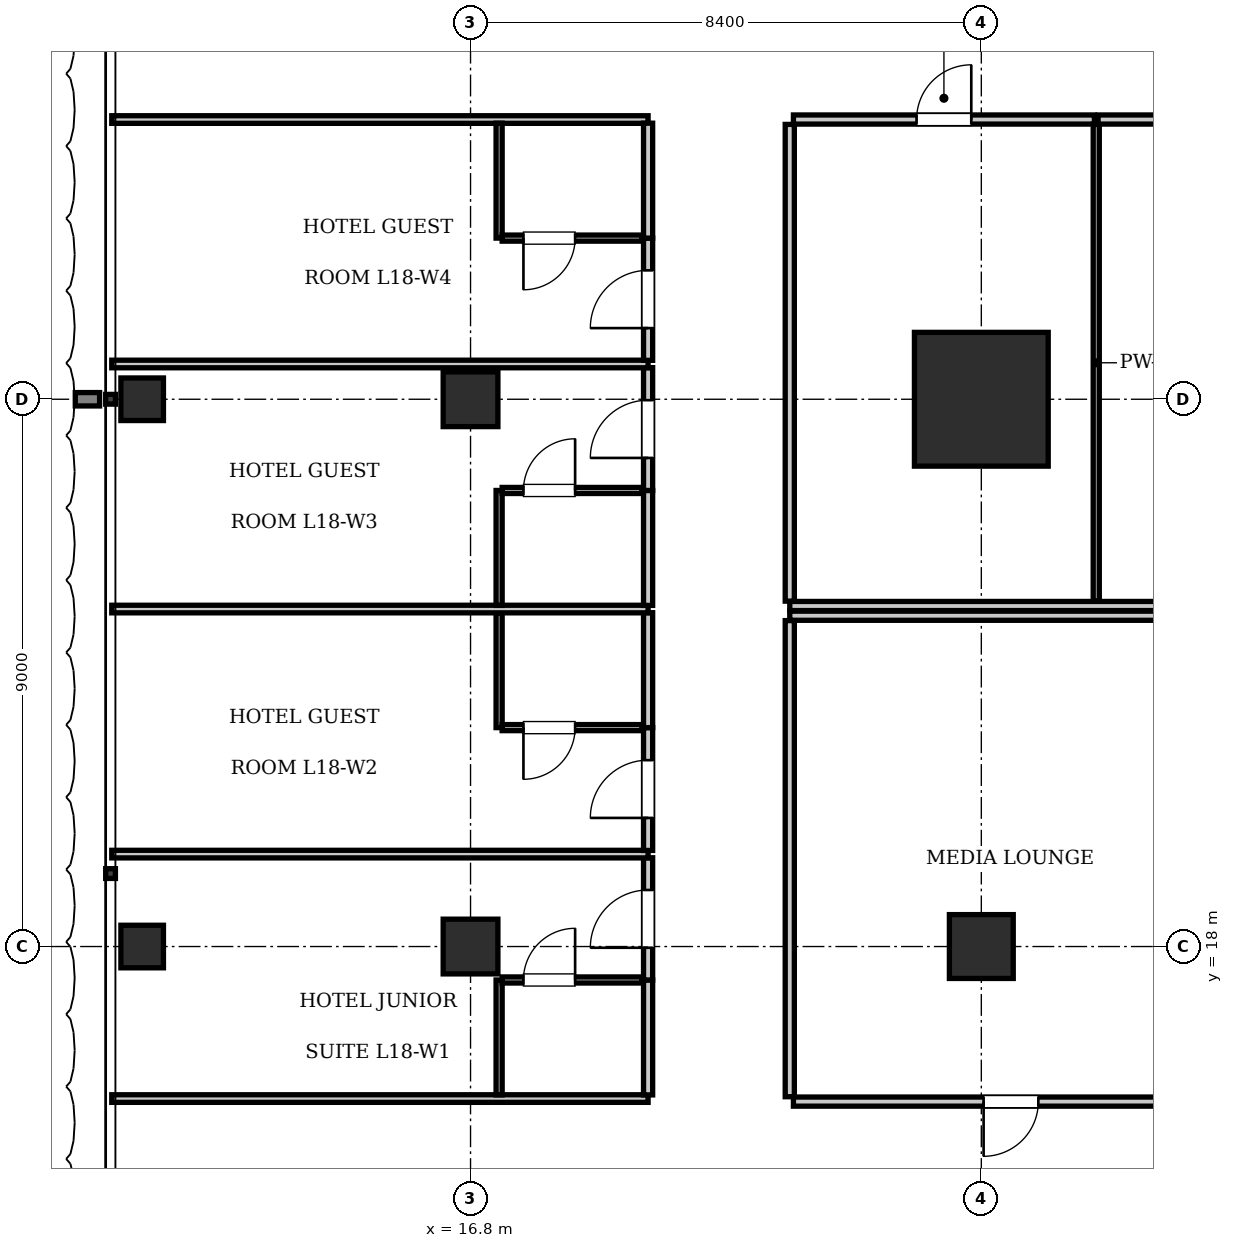
"""IFC4 building model, lengths in metres.
Left out: names, types, materials, properties, quantities, classifications, styles, units other than length and angle.
Written with IfcOpenShell. Run it as: python <this file> out.ifc"""

import sys

from ifc_helpers import new_model, si_unit, direction, frame, frame_2d, origin, origin_2d, place, context, subcontext, project, spatial, rectangle, i_section, extrude, element, fill, save


model = new_model("IFC4")
c1 = context("Model", 3, precision=1e-05, world=origin(), true_north=direction((0.0, 1.0)))
c2 = subcontext(c1, "Body", "Model", "MODEL_VIEW")
j1 = project(units=[si_unit("LENGTHUNIT", "METRE"), si_unit("PLANEANGLEUNIT", "RADIAN")], contexts=[c1])
p1 = place(None, origin())
s1 = spatial("IfcSite", under=j1, at=p1, CompositionType="ELEMENT")
p2 = place(p1, origin())
s2 = spatial("IfcBuilding", under=s1, at=p2, CompositionType="ELEMENT")
p3 = place(p2, frame((0.0, 0.0, 77.0)))
s3 = spatial("IfcBuildingStorey", under=s2, at=p3, CompositionType="ELEMENT", Elevation=77.0)
p4 = place(p3, frame((25.2, 27.0, 0.0), z_axis=(0.0, 0.0, 1.0), x_axis=(1.0, 0.0, 0.0)))
e1 = element("IfcColumn", 1, at=p4, inside=s3, PredefinedType="COLUMN", context=c2, shape_type="SweptSolid", body=[
    extrude(rectangle(XDim=2.2, YDim=2.2, at=origin_2d()), origin(), (0.0, 0.0, 1.0), 3.85),
])
p5 = place(p3, frame((25.2, 18.0, 0.0), z_axis=(0.0, 0.0, 1.0), x_axis=(1.0, 0.0, 0.0)))
e2 = element("IfcColumn", 2, at=p5, inside=s3, PredefinedType="COLUMN", context=c2, shape_type="SweptSolid", body=[
    extrude(rectangle(XDim=1.05, YDim=1.05, at=origin_2d()), origin(), (0.0, 0.0, 1.0), 3.85),
])
for number, where, z_axis, x_axis in (
    (3, (16.8, 18.0, 0.0), (0.0, 0.0, 1.0), (1.0, 0.0, 0.0)),
    (4, (16.8, 27.0, 0.0), (0.0, 0.0, 1.0), (1.0, 0.0, 0.0)),
):
    element("IfcColumn", number, at=place(p3, frame(where, z_axis=z_axis, x_axis=x_axis)), inside=s3, PredefinedType="COLUMN", context=c2, shape_type="SweptSolid", body=[
        extrude(rectangle(XDim=0.9, YDim=0.9, at=origin_2d()), origin(), (0.0, 0.0, 1.0), 3.85),
    ])
for number, where, z_axis, x_axis in (
    (5, (11.4, 18.0, 0.0), (0.0, 0.0, 1.0), (1.0, 0.0, 0.0)),
    (6, (11.4, 27.0, 0.0), (0.0, 0.0, 1.0), (1.0, 0.0, 0.0)),
):
    element("IfcColumn", number, at=place(p3, frame(where, z_axis=z_axis, x_axis=x_axis)), inside=s3, PredefinedType="COLUMN", context=c2, shape_type="SweptSolid", body=[
        extrude(i_section(OverallWidth=0.7, OverallDepth=0.7, WebThickness=0.028, FlangeThickness=0.044, at=origin_2d()), origin(), (0.0, 0.0, 1.0), 3.85),
    ])
p6 = place(p3, frame((22.05, 23.6, 0.0), z_axis=(0.0, 0.0, 1.0), x_axis=(1.0, 0.0, 0.0)))
e7 = element("IfcWall", 7, at=p6, inside=s3, PredefinedType="PARTITIONING", context=c2, shape_type="SweptSolid", body=[
    extrude(rectangle(XDim=31.5, YDim=0.15, at=frame_2d((15.75, 0.0))), origin(), (0.0, 0.0, 1.0), 3.61),
])
p7 = place(p3, frame((22.05, 23.68, 0.0), z_axis=(0.0, 0.0, 1.0), x_axis=(0.0, 1.0, 0.0)))
e8 = element("IfcWall", 8, at=p7, inside=s3, PredefinedType="PARTITIONING", context=c2, shape_type="SweptSolid", body=[
    extrude(rectangle(XDim=7.84, YDim=0.15, at=frame_2d((3.92, 0.0))), origin(), (0.0, 0.0, 1.0), 3.61),
])
p8 = place(p3, frame((22.11, 31.6, 0.0), z_axis=(0.0, 0.0, 1.0), x_axis=(1.0, 0.0, 0.0)))
e9 = element("IfcWall", 9, at=p8, inside=s3, PredefinedType="PARTITIONING", context=c2, shape_type="SweptSolid", body=[
    extrude(rectangle(XDim=4.95, YDim=0.15, at=frame_2d((2.475, 0.0))), origin(), (0.0, 0.0, 1.0), 3.61),
])
p9 = place(p8, frame((2.025, 0.0, 0.0)))
e10 = element("IfcOpeningElement", 10, at=p9, cuts=e9, PredefinedType="OPENING", context=c2, shape_type="SweptSolid", body=[
    extrude(rectangle(XDim=0.9, YDim=2.1, at=frame_2d((0.45, 1.05))), frame((0.0, 0.085, 0.0), z_axis=(0.0, -1.0, 0.0), x_axis=(1.0, 0.0, 0.0)), (0.0, 0.0, 1.0), 0.17),
])
p10 = place(p3, frame((27.09, 23.68, 0.0), z_axis=(0.0, 0.0, 1.0), x_axis=(0.0, 1.0, 0.0)))
e11 = element("IfcWall", 11, at=p10, inside=s3, PredefinedType="PARTITIONING", context=c2, shape_type="SweptSolid", body=[
    extrude(rectangle(XDim=7.84, YDim=0.1, at=frame_2d((3.92, 0.0))), origin(), (0.0, 0.0, 1.0), 3.61),
])
p11 = place(p3, frame((27.12, 31.6, 0.0), z_axis=(0.0, 0.0, 1.0), x_axis=(1.0, 0.0, 0.0)))
e12 = element("IfcWall", 12, at=p11, inside=s3, PredefinedType="PARTITIONING", context=c2, shape_type="SweptSolid", body=[
    extrude(rectangle(XDim=6.87, YDim=0.15, at=frame_2d((3.435, 0.0))), origin(), (0.0, 0.0, 1.0), 3.61),
])
p12 = place(p11, frame((2.985, 0.0, 0.0)))
e13 = element("IfcOpeningElement", 13, at=p12, cuts=e12, PredefinedType="OPENING", context=c2, shape_type="SweptSolid", body=[
    extrude(rectangle(XDim=0.9, YDim=2.1, at=frame_2d((0.45, 1.05))), frame((0.0, 0.085, 0.0), z_axis=(0.0, -1.0, 0.0), x_axis=(1.0, 0.0, 0.0)), (0.0, 0.0, 1.0), 0.17),
])
p13 = place(p3, frame((22.05, 23.44, 0.0), z_axis=(0.0, 0.0, 1.0), x_axis=(1.0, 0.0, 0.0)))
e14 = element("IfcWall", 14, at=p13, inside=s3, PredefinedType="PARTITIONING", context=c2, shape_type="SweptSolid", body=[
    extrude(rectangle(XDim=31.5, YDim=0.15, at=frame_2d((15.75, 0.0))), origin(), (0.0, 0.0, 1.0), 3.61),
])
p14 = place(p3, frame((22.05, 15.53, 0.0), z_axis=(0.0, 0.0, 1.0), x_axis=(0.0, 1.0, 0.0)))
e15 = element("IfcWall", 15, at=p14, inside=s3, PredefinedType="PARTITIONING", context=c2, shape_type="SweptSolid", body=[
    extrude(rectangle(XDim=7.83, YDim=0.15, at=frame_2d((3.915, 0.0))), origin(), (0.0, 0.0, 1.0), 3.61),
])
p15 = place(p3, frame((22.11, 15.45, 0.0), z_axis=(0.0, 0.0, 1.0), x_axis=(1.0, 0.0, 0.0)))
e16 = element("IfcWall", 16, at=p15, inside=s3, PredefinedType="PARTITIONING", context=c2, shape_type="SweptSolid", body=[
    extrude(rectangle(XDim=7.155, YDim=0.15, at=frame_2d((3.577, 0.0))), origin(), (0.0, 0.0, 1.0), 3.61),
])
p16 = place(p15, frame((3.127, 0.0, 0.0)))
e17 = element("IfcOpeningElement", 17, at=p16, cuts=e16, PredefinedType="OPENING", context=c2, shape_type="SweptSolid", body=[
    extrude(rectangle(XDim=0.9, YDim=2.1, at=frame_2d((0.45, 1.05))), frame((0.0, 0.085, 0.0), z_axis=(0.0, -1.0, 0.0), x_axis=(1.0, 0.0, 0.0)), (0.0, 0.0, 1.0), 0.17),
])
for number, where, z_axis, x_axis in (
    (18, (10.9, 15.5, 0.0), (0.0, 0.0, 1.0), (1.0, 0.0, 0.0)),
    (19, (10.9, 31.6, 0.0), (0.0, 0.0, 1.0), (1.0, 0.0, 0.0)),
):
    element("IfcWall", number, at=place(p3, frame(where, z_axis=z_axis, x_axis=x_axis)), inside=s3, PredefinedType="PARTITIONING", context=c2, shape_type="SweptSolid", body=[
        extrude(rectangle(XDim=8.82, YDim=0.125, at=frame_2d((4.41, 0.0))), origin(), (0.0, 0.0, 1.0), 3.61),
    ])
p17 = place(p3, frame((19.72, 15.56, 0.0), z_axis=(0.0, 0.0, 1.0), x_axis=(0.0, 1.0, 0.0)))
e20 = element("IfcWall", 20, at=p17, inside=s3, PredefinedType="PARTITIONING", context=c2, shape_type="SweptSolid", body=[
    extrude(rectangle(XDim=1.89, YDim=0.15, at=frame_2d((0.945, 0.0))), origin(), (0.0, 0.0, 1.0), 3.61),
])
p18 = place(p3, frame((19.72, 17.45, 0.0), z_axis=(0.0, 0.0, 1.0), x_axis=(0.0, 1.0, 0.0)))
e21 = element("IfcWall", 21, at=p18, inside=s3, PredefinedType="PARTITIONING", context=c2, shape_type="SweptSolid", body=[
    extrude(rectangle(XDim=2.01, YDim=0.15, at=frame_2d((1.005, 0.0))), origin(), (0.0, 0.0, 1.0), 3.61),
])
p19 = place(p18, frame((0.53, 0.0, 0.0)))
e22 = element("IfcOpeningElement", 22, at=p19, cuts=e21, PredefinedType="OPENING", context=c2, shape_type="SweptSolid", body=[
    extrude(rectangle(XDim=0.95, YDim=2.15, at=frame_2d((0.475, 1.075))), frame((0.0, 0.085, 0.0), z_axis=(0.0, -1.0, 0.0), x_axis=(1.0, 0.0, 0.0)), (0.0, 0.0, 1.0), 0.17),
])
p20 = place(p3, frame((17.27, 15.56, 0.0), z_axis=(0.0, 0.0, 1.0), x_axis=(0.0, 1.0, 0.0)))
e23 = element("IfcWall", 23, at=p20, inside=s3, PredefinedType="PARTITIONING", context=c2, shape_type="SweptSolid", body=[
    extrude(rectangle(XDim=1.89, YDim=0.1, at=frame_2d((0.945, 0.0))), origin(), (0.0, 0.0, 1.0), 3.61),
])
p21 = place(p3, frame((17.32, 17.45, 0.0), z_axis=(0.0, 0.0, 1.0), x_axis=(1.0, 0.0, 0.0)))
e24 = element("IfcWall", 24, at=p21, inside=s3, PredefinedType="PARTITIONING", context=c2, shape_type="SweptSolid", body=[
    extrude(rectangle(XDim=2.3, YDim=0.1, at=frame_2d((1.15, 0.0))), origin(), (0.0, 0.0, 1.0), 3.61),
])
p22 = place(p21, frame((0.35, 0.0, 0.0)))
e25 = element("IfcOpeningElement", 25, at=p22, cuts=e24, PredefinedType="OPENING", context=c2, shape_type="SweptSolid", body=[
    extrude(rectangle(XDim=0.85, YDim=2.1, at=frame_2d((0.425, 1.05))), frame((0.0, 0.06, 0.0), z_axis=(0.0, -1.0, 0.0), x_axis=(1.0, 0.0, 0.0)), (0.0, 0.0, 1.0), 0.12),
])
p23 = place(p3, frame((10.9, 19.52, 0.0), z_axis=(0.0, 0.0, 1.0), x_axis=(1.0, 0.0, 0.0)))
e26 = element("IfcWall", 26, at=p23, inside=s3, PredefinedType="PARTITIONING", context=c2, shape_type="SweptSolid", body=[
    extrude(rectangle(XDim=8.82, YDim=0.125, at=frame_2d((4.41, 0.0))), origin(), (0.0, 0.0, 1.0), 3.61),
])
p24 = place(p3, frame((19.72, 19.58, 0.0), z_axis=(0.0, 0.0, 1.0), x_axis=(0.0, 1.0, 0.0)))
e27 = element("IfcWall", 27, at=p24, inside=s3, PredefinedType="PARTITIONING", context=c2, shape_type="SweptSolid", body=[
    extrude(rectangle(XDim=2.02, YDim=0.15, at=frame_2d((1.01, 0.0))), origin(), (0.0, 0.0, 1.0), 3.61),
])
p25 = place(p24, frame((0.535, 0.0, 0.0)))
e28 = element("IfcOpeningElement", 28, at=p25, cuts=e27, PredefinedType="OPENING", context=c2, shape_type="SweptSolid", body=[
    extrude(rectangle(XDim=0.95, YDim=2.15, at=frame_2d((0.475, 1.075))), frame((0.0, 0.085, 0.0), z_axis=(0.0, -1.0, 0.0), x_axis=(1.0, 0.0, 0.0)), (0.0, 0.0, 1.0), 0.17),
])
p26 = place(p3, frame((19.72, 21.6, 0.0), z_axis=(0.0, 0.0, 1.0), x_axis=(0.0, 1.0, 0.0)))
e29 = element("IfcWall", 29, at=p26, inside=s3, PredefinedType="PARTITIONING", context=c2, shape_type="SweptSolid", body=[
    extrude(rectangle(XDim=1.89, YDim=0.15, at=frame_2d((0.945, 0.0))), origin(), (0.0, 0.0, 1.0), 3.61),
])
p27 = place(p3, frame((17.27, 21.6, 0.0), z_axis=(0.0, 0.0, 1.0), x_axis=(0.0, 1.0, 0.0)))
e30 = element("IfcWall", 30, at=p27, inside=s3, PredefinedType="PARTITIONING", context=c2, shape_type="SweptSolid", body=[
    extrude(rectangle(XDim=1.89, YDim=0.1, at=frame_2d((0.945, 0.0))), origin(), (0.0, 0.0, 1.0), 3.61),
])
p28 = place(p3, frame((17.32, 21.6, 0.0), z_axis=(0.0, 0.0, 1.0), x_axis=(1.0, 0.0, 0.0)))
e31 = element("IfcWall", 31, at=p28, inside=s3, PredefinedType="PARTITIONING", context=c2, shape_type="SweptSolid", body=[
    extrude(rectangle(XDim=2.3, YDim=0.1, at=frame_2d((1.15, 0.0))), origin(), (0.0, 0.0, 1.0), 3.61),
])
p29 = place(p28, frame((0.35, 0.0, 0.0)))
e32 = element("IfcOpeningElement", 32, at=p29, cuts=e31, PredefinedType="OPENING", context=c2, shape_type="SweptSolid", body=[
    extrude(rectangle(XDim=0.85, YDim=2.1, at=frame_2d((0.425, 1.05))), frame((0.0, 0.06, 0.0), z_axis=(0.0, -1.0, 0.0), x_axis=(1.0, 0.0, 0.0)), (0.0, 0.0, 1.0), 0.12),
])
p30 = place(p3, frame((10.9, 23.55, 0.0), z_axis=(0.0, 0.0, 1.0), x_axis=(1.0, 0.0, 0.0)))
e33 = element("IfcWall", 33, at=p30, inside=s3, PredefinedType="PARTITIONING", context=c2, shape_type="SweptSolid", body=[
    extrude(rectangle(XDim=8.82, YDim=0.125, at=frame_2d((4.41, 0.0))), origin(), (0.0, 0.0, 1.0), 3.61),
])
p31 = place(p3, frame((19.72, 23.61, 0.0), z_axis=(0.0, 0.0, 1.0), x_axis=(0.0, 1.0, 0.0)))
e34 = element("IfcWall", 34, at=p31, inside=s3, PredefinedType="PARTITIONING", context=c2, shape_type="SweptSolid", body=[
    extrude(rectangle(XDim=1.89, YDim=0.15, at=frame_2d((0.945, 0.0))), origin(), (0.0, 0.0, 1.0), 3.61),
])
p32 = place(p3, frame((19.72, 25.5, 0.0), z_axis=(0.0, 0.0, 1.0), x_axis=(0.0, 1.0, 0.0)))
e35 = element("IfcWall", 35, at=p32, inside=s3, PredefinedType="PARTITIONING", context=c2, shape_type="SweptSolid", body=[
    extrude(rectangle(XDim=2.02, YDim=0.15, at=frame_2d((1.01, 0.0))), origin(), (0.0, 0.0, 1.0), 3.61),
])
p33 = place(p32, frame((0.535, 0.0, 0.0)))
e36 = element("IfcOpeningElement", 36, at=p33, cuts=e35, PredefinedType="OPENING", context=c2, shape_type="SweptSolid", body=[
    extrude(rectangle(XDim=0.95, YDim=2.15, at=frame_2d((0.475, 1.075))), frame((0.0, 0.085, 0.0), z_axis=(0.0, -1.0, 0.0), x_axis=(1.0, 0.0, 0.0)), (0.0, 0.0, 1.0), 0.17),
])
p34 = place(p3, frame((17.27, 23.61, 0.0), z_axis=(0.0, 0.0, 1.0), x_axis=(0.0, 1.0, 0.0)))
e37 = element("IfcWall", 37, at=p34, inside=s3, PredefinedType="PARTITIONING", context=c2, shape_type="SweptSolid", body=[
    extrude(rectangle(XDim=1.89, YDim=0.1, at=frame_2d((0.945, 0.0))), origin(), (0.0, 0.0, 1.0), 3.61),
])
p35 = place(p3, frame((17.32, 25.5, 0.0), z_axis=(0.0, 0.0, 1.0), x_axis=(1.0, 0.0, 0.0)))
e38 = element("IfcWall", 38, at=p35, inside=s3, PredefinedType="PARTITIONING", context=c2, shape_type="SweptSolid", body=[
    extrude(rectangle(XDim=2.3, YDim=0.1, at=frame_2d((1.15, 0.0))), origin(), (0.0, 0.0, 1.0), 3.61),
])
p36 = place(p35, frame((0.35, 0.0, 0.0)))
e39 = element("IfcOpeningElement", 39, at=p36, cuts=e38, PredefinedType="OPENING", context=c2, shape_type="SweptSolid", body=[
    extrude(rectangle(XDim=0.85, YDim=2.1, at=frame_2d((0.425, 1.05))), frame((0.0, 0.06, 0.0), z_axis=(0.0, -1.0, 0.0), x_axis=(1.0, 0.0, 0.0)), (0.0, 0.0, 1.0), 0.12),
])
p37 = place(p3, frame((10.9, 27.58, 0.0), z_axis=(0.0, 0.0, 1.0), x_axis=(1.0, 0.0, 0.0)))
e40 = element("IfcWall", 40, at=p37, inside=s3, PredefinedType="PARTITIONING", context=c2, shape_type="SweptSolid", body=[
    extrude(rectangle(XDim=8.82, YDim=0.125, at=frame_2d((4.41, 0.0))), origin(), (0.0, 0.0, 1.0), 3.61),
])
p38 = place(p3, frame((19.72, 27.64, 0.0), z_axis=(0.0, 0.0, 1.0), x_axis=(0.0, 1.0, 0.0)))
e41 = element("IfcWall", 41, at=p38, inside=s3, PredefinedType="PARTITIONING", context=c2, shape_type="SweptSolid", body=[
    extrude(rectangle(XDim=2.01, YDim=0.15, at=frame_2d((1.005, 0.0))), origin(), (0.0, 0.0, 1.0), 3.61),
])
p39 = place(p38, frame((0.53, 0.0, 0.0)))
e42 = element("IfcOpeningElement", 42, at=p39, cuts=e41, PredefinedType="OPENING", context=c2, shape_type="SweptSolid", body=[
    extrude(rectangle(XDim=0.95, YDim=2.15, at=frame_2d((0.475, 1.075))), frame((0.0, 0.085, 0.0), z_axis=(0.0, -1.0, 0.0), x_axis=(1.0, 0.0, 0.0)), (0.0, 0.0, 1.0), 0.17),
])
p40 = place(p3, frame((19.72, 29.65, 0.0), z_axis=(0.0, 0.0, 1.0), x_axis=(0.0, 1.0, 0.0)))
e43 = element("IfcWall", 43, at=p40, inside=s3, PredefinedType="PARTITIONING", context=c2, shape_type="SweptSolid", body=[
    extrude(rectangle(XDim=1.89, YDim=0.15, at=frame_2d((0.945, 0.0))), origin(), (0.0, 0.0, 1.0), 3.61),
])
p41 = place(p3, frame((17.27, 29.65, 0.0), z_axis=(0.0, 0.0, 1.0), x_axis=(0.0, 1.0, 0.0)))
e44 = element("IfcWall", 44, at=p41, inside=s3, PredefinedType="PARTITIONING", context=c2, shape_type="SweptSolid", body=[
    extrude(rectangle(XDim=1.89, YDim=0.1, at=frame_2d((0.945, 0.0))), origin(), (0.0, 0.0, 1.0), 3.61),
])
p42 = place(p3, frame((17.32, 29.65, 0.0), z_axis=(0.0, 0.0, 1.0), x_axis=(1.0, 0.0, 0.0)))
e45 = element("IfcWall", 45, at=p42, inside=s3, PredefinedType="PARTITIONING", context=c2, shape_type="SweptSolid", body=[
    extrude(rectangle(XDim=2.3, YDim=0.1, at=frame_2d((1.15, 0.0))), origin(), (0.0, 0.0, 1.0), 3.61),
])
p43 = place(p42, frame((0.35, 0.0, 0.0)))
e46 = element("IfcOpeningElement", 46, at=p43, cuts=e45, PredefinedType="OPENING", context=c2, shape_type="SweptSolid", body=[
    extrude(rectangle(XDim=0.85, YDim=2.1, at=frame_2d((0.425, 1.05))), frame((0.0, 0.06, 0.0), z_axis=(0.0, -1.0, 0.0), x_axis=(1.0, 0.0, 0.0)), (0.0, 0.0, 1.0), 0.12),
])
p44 = place(p9, origin())
e47 = element("IfcDoor", 47, at=p44, inside=s3, OperationType="SINGLE_SWING_RIGHT", PredefinedType="DOOR", context=c2, shape_type="SweptSolid", body=[
    extrude(rectangle(XDim=0.9, YDim=2.1, at=frame_2d((0.45, 1.05))), frame((0.0, 0.025, 0.0), z_axis=(0.0, -1.0, 0.0), x_axis=(1.0, 0.0, 0.0)), (0.0, 0.0, 1.0), 0.05),
])
fill(e10, e47)
p45 = place(p16, frame((0.9, 0.0, 0.0), z_axis=(0.0, 0.0, 1.0), x_axis=(-1.0, 0.0, 0.0)))
e48 = element("IfcDoor", 48, at=p45, inside=s3, OperationType="SINGLE_SWING_RIGHT", PredefinedType="DOOR", context=c2, shape_type="SweptSolid", body=[
    extrude(rectangle(XDim=0.9, YDim=2.1, at=frame_2d((0.45, 1.05))), frame((0.0, 0.025, 0.0), z_axis=(0.0, -1.0, 0.0), x_axis=(1.0, 0.0, 0.0)), (0.0, 0.0, 1.0), 0.05),
])
fill(e17, e48)
p46 = place(p22, origin())
e49 = element("IfcDoor", 49, at=p46, inside=s3, OperationType="SINGLE_SWING_RIGHT", PredefinedType="DOOR", context=c2, shape_type="SweptSolid", body=[
    extrude(rectangle(XDim=0.85, YDim=2.1, at=frame_2d((0.425, 1.05))), frame((0.0, 0.025, 0.0), z_axis=(0.0, -1.0, 0.0), x_axis=(1.0, 0.0, 0.0)), (0.0, 0.0, 1.0), 0.05),
])
fill(e25, e49)
p47 = place(p19, origin())
e50 = element("IfcDoor", 50, at=p47, inside=s3, OperationType="SINGLE_SWING_LEFT", PredefinedType="DOOR", context=c2, shape_type="SweptSolid", body=[
    extrude(rectangle(XDim=0.95, YDim=2.15, at=frame_2d((0.475, 1.075))), frame((0.0, 0.025, 0.0), z_axis=(0.0, -1.0, 0.0), x_axis=(1.0, 0.0, 0.0)), (0.0, 0.0, 1.0), 0.05),
])
fill(e22, e50)
p48 = place(p29, frame((0.85, 0.0, 0.0), z_axis=(0.0, 0.0, 1.0), x_axis=(-1.0, 0.0, 0.0)))
e51 = element("IfcDoor", 51, at=p48, inside=s3, OperationType="SINGLE_SWING_RIGHT", PredefinedType="DOOR", context=c2, shape_type="SweptSolid", body=[
    extrude(rectangle(XDim=0.85, YDim=2.1, at=frame_2d((0.425, 1.05))), frame((0.0, 0.025, 0.0), z_axis=(0.0, -1.0, 0.0), x_axis=(1.0, 0.0, 0.0)), (0.0, 0.0, 1.0), 0.05),
])
fill(e32, e51)
p49 = place(p25, origin())
e52 = element("IfcDoor", 52, at=p49, inside=s3, OperationType="SINGLE_SWING_LEFT", PredefinedType="DOOR", context=c2, shape_type="SweptSolid", body=[
    extrude(rectangle(XDim=0.95, YDim=2.15, at=frame_2d((0.475, 1.075))), frame((0.0, 0.025, 0.0), z_axis=(0.0, -1.0, 0.0), x_axis=(1.0, 0.0, 0.0)), (0.0, 0.0, 1.0), 0.05),
])
fill(e28, e52)
p50 = place(p36, origin())
e53 = element("IfcDoor", 53, at=p50, inside=s3, OperationType="SINGLE_SWING_RIGHT", PredefinedType="DOOR", context=c2, shape_type="SweptSolid", body=[
    extrude(rectangle(XDim=0.85, YDim=2.1, at=frame_2d((0.425, 1.05))), frame((0.0, 0.025, 0.0), z_axis=(0.0, -1.0, 0.0), x_axis=(1.0, 0.0, 0.0)), (0.0, 0.0, 1.0), 0.05),
])
fill(e39, e53)
p51 = place(p33, origin())
e54 = element("IfcDoor", 54, at=p51, inside=s3, OperationType="SINGLE_SWING_LEFT", PredefinedType="DOOR", context=c2, shape_type="SweptSolid", body=[
    extrude(rectangle(XDim=0.95, YDim=2.15, at=frame_2d((0.475, 1.075))), frame((0.0, 0.025, 0.0), z_axis=(0.0, -1.0, 0.0), x_axis=(1.0, 0.0, 0.0)), (0.0, 0.0, 1.0), 0.05),
])
fill(e36, e54)
p52 = place(p43, frame((0.85, 0.0, 0.0), z_axis=(0.0, 0.0, 1.0), x_axis=(-1.0, 0.0, 0.0)))
e55 = element("IfcDoor", 55, at=p52, inside=s3, OperationType="SINGLE_SWING_RIGHT", PredefinedType="DOOR", context=c2, shape_type="SweptSolid", body=[
    extrude(rectangle(XDim=0.85, YDim=2.1, at=frame_2d((0.425, 1.05))), frame((0.0, 0.025, 0.0), z_axis=(0.0, -1.0, 0.0), x_axis=(1.0, 0.0, 0.0)), (0.0, 0.0, 1.0), 0.05),
])
fill(e46, e55)
p53 = place(p39, origin())
e56 = element("IfcDoor", 56, at=p53, inside=s3, OperationType="SINGLE_SWING_LEFT", PredefinedType="DOOR", context=c2, shape_type="SweptSolid", body=[
    extrude(rectangle(XDim=0.95, YDim=2.15, at=frame_2d((0.475, 1.075))), frame((0.0, 0.025, 0.0), z_axis=(0.0, -1.0, 0.0), x_axis=(1.0, 0.0, 0.0)), (0.0, 0.0, 1.0), 0.05),
])
fill(e42, e56)
save(model, sys.argv[1])
